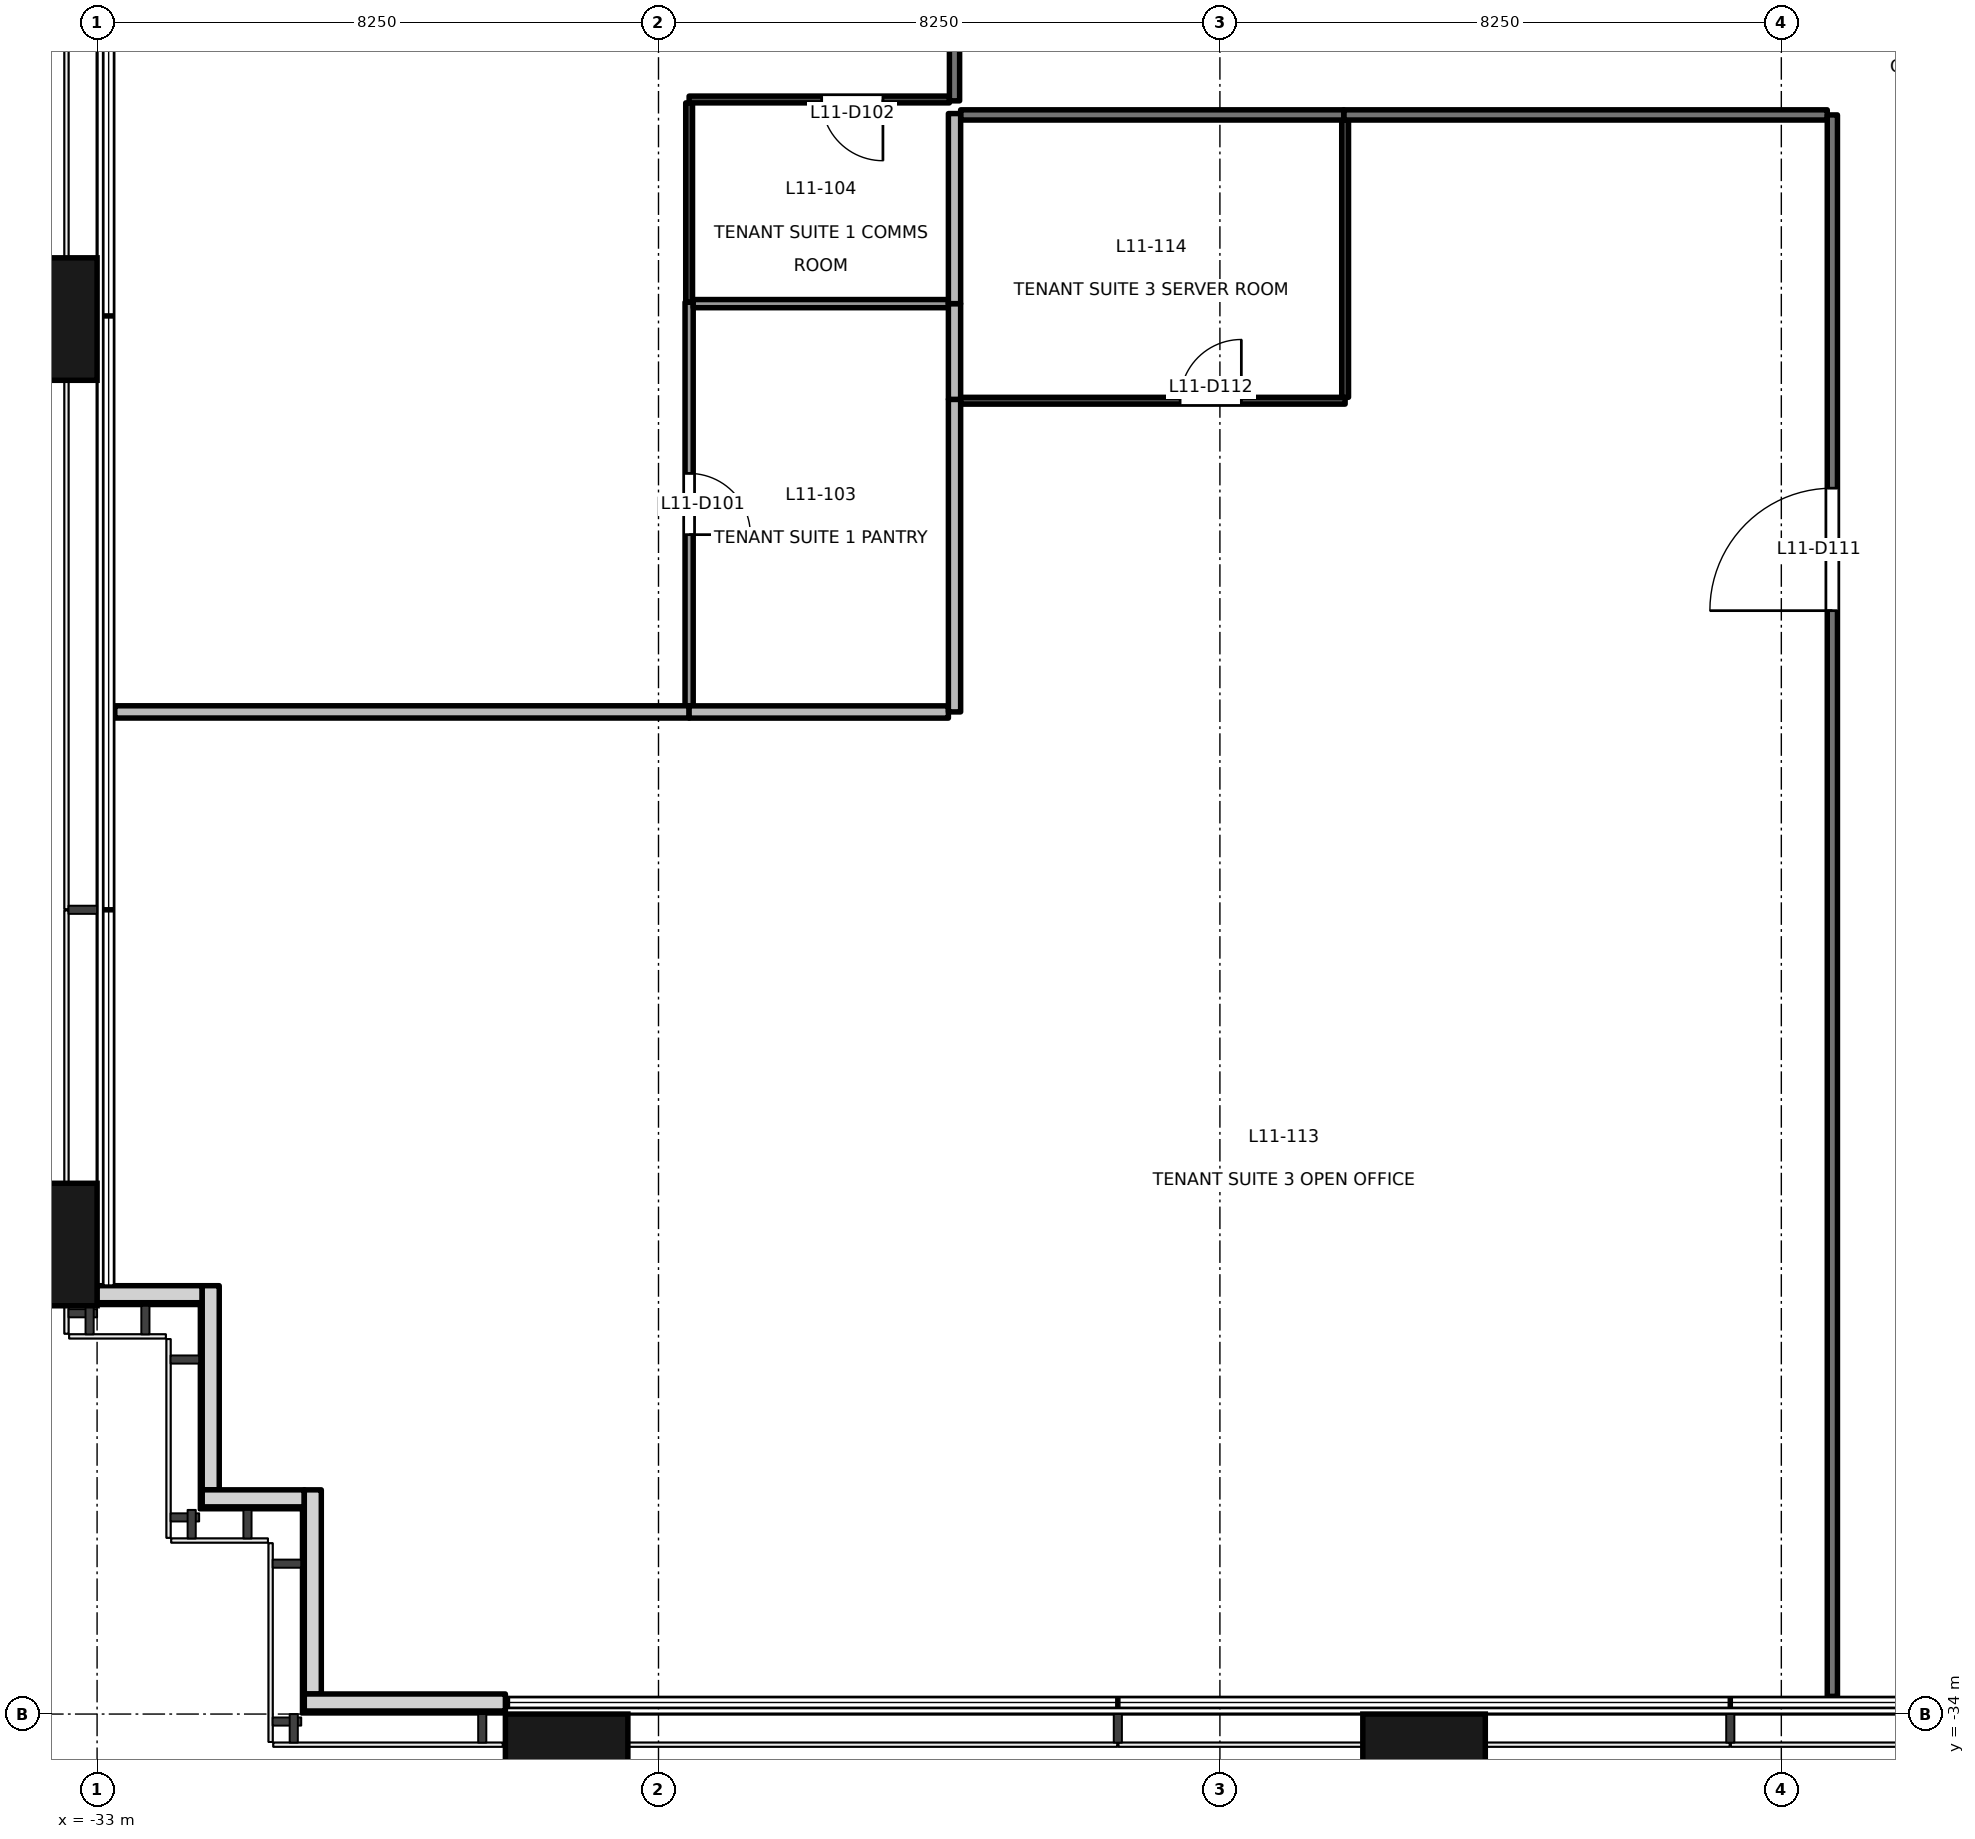
"""IFC4 building model, lengths in metres.
Left out: names, types, materials, properties, quantities, classifications, styles, units other than length and angle.
Written with IfcOpenShell. Run it as: python <this file> out.ifc"""

import sys

from ifc_helpers import new_model, si_unit, direction, frame, frame_2d, origin, origin_2d, place, context, subcontext, project, spatial, rectangle, extrude, element, fill, save


model = new_model("IFC4")
c1 = context("Model", 3, precision=1e-05, world=origin(), true_north=direction((0.0, 1.0)))
c2 = subcontext(c1, "Body", "Model", "MODEL_VIEW")
j1 = project(units=[si_unit("LENGTHUNIT", "METRE"), si_unit("PLANEANGLEUNIT", "RADIAN")], contexts=[c1])
p1 = place(None, origin())
s1 = spatial("IfcSite", under=j1, at=p1, CompositionType="ELEMENT")
p2 = place(p1, origin())
s2 = spatial("IfcBuilding", under=s1, at=p2, CompositionType="ELEMENT")
p3 = place(p2, frame((0.0, 0.0, 52.9)))
s3 = spatial("IfcBuildingStorey", under=s2, at=p3, CompositionType="ELEMENT", Elevation=52.9)
for number, where, z_axis, x_axis in (
    (1, (-26.1, -34.9, -0.2), (0.0, 0.0, 1.0), (1.0, 0.0, 0.0)),
    (2, (-13.5, -34.9, -0.2), (0.0, 0.0, 1.0), (1.0, 0.0, 0.0)),
    (3, (-33.9, -27.1, -0.2), (0.0, 0.0, 1.0), (0.0, 1.0, 0.0)),
    (4, (-33.9, -13.5, -0.2), (0.0, 0.0, 1.0), (0.0, 1.0, 0.0)),
):
    element("IfcColumn", number, at=place(p3, frame(where, z_axis=z_axis, x_axis=x_axis)), inside=s3, PredefinedType="COLUMN", context=c2, shape_type="SweptSolid", body=[
        extrude(rectangle(XDim=1.8, YDim=1.8, at=origin_2d()), origin(), (0.0, 0.0, 1.0), 4.1),
    ])
p4 = place(p3, frame((-33.005, -27.83, 0.0), z_axis=(0.0, 0.0, 1.0), x_axis=(1.0, 0.0, 0.0)))
e5 = element("IfcWall", 5, at=p4, inside=s3, PredefinedType="SOLIDWALL", context=c2, shape_type="SweptSolid", body=[
    extrude(rectangle(XDim=1.55, YDim=0.25, at=frame_2d((0.775, 0.0))), origin(), (0.0, 0.0, 1.0), 3.9),
])
p5 = place(p3, frame((-31.33, -27.705, 0.0), z_axis=(0.0, 0.0, 1.0), x_axis=(0.0, -1.0, 0.0)))
e6 = element("IfcWall", 6, at=p5, inside=s3, PredefinedType="SOLIDWALL", context=c2, shape_type="SweptSolid", body=[
    extrude(rectangle(XDim=3.0, YDim=0.25, at=frame_2d((1.5, 0.0))), origin(), (0.0, 0.0, 1.0), 3.9),
])
p6 = place(p3, frame((-31.455, -30.83, 0.0), z_axis=(0.0, 0.0, 1.0), x_axis=(1.0, 0.0, 0.0)))
e7 = element("IfcWall", 7, at=p6, inside=s3, PredefinedType="SOLIDWALL", context=c2, shape_type="SweptSolid", body=[
    extrude(rectangle(XDim=1.5, YDim=0.25, at=frame_2d((0.75, 0.0))), origin(), (0.0, 0.0, 1.0), 3.9),
])
p7 = place(p3, frame((-29.83, -30.705, 0.0), z_axis=(0.0, 0.0, 1.0), x_axis=(0.0, -1.0, 0.0)))
e8 = element("IfcWall", 8, at=p7, inside=s3, PredefinedType="SOLIDWALL", context=c2, shape_type="SweptSolid", body=[
    extrude(rectangle(XDim=3.0, YDim=0.25, at=frame_2d((1.5, 0.0))), origin(), (0.0, 0.0, 1.0), 3.9),
])
p8 = place(p3, frame((-29.955, -33.83, 0.0), z_axis=(0.0, 0.0, 1.0), x_axis=(1.0, 0.0, 0.0)))
e9 = element("IfcWall", 9, at=p8, inside=s3, PredefinedType="SOLIDWALL", context=c2, shape_type="SweptSolid", body=[
    extrude(rectangle(XDim=2.955, YDim=0.25, at=frame_2d((1.478, 0.0))), origin(), (0.0, 0.0, 1.0), 3.9),
])
p9 = place(p3, frame((-20.4, -10.293, 0.0), z_axis=(0.0, 0.0, 1.0), x_axis=(0.0, 1.0, 0.0)))
e10 = element("IfcWall", 10, at=p9, inside=s3, PredefinedType="PARTITIONING", context=c2, shape_type="SweptSolid", body=[
    extrude(rectangle(XDim=6.04, YDim=0.15, at=frame_2d((3.02, 0.0))), origin(), (0.0, 0.0, 1.0), 3.3),
])
p10 = place(p9, frame((2.12, 0.0, 0.0)))
e11 = element("IfcOpeningElement", 11, at=p10, cuts=e10, PredefinedType="OPENING", context=c2, shape_type="SweptSolid", body=[
    extrude(rectangle(XDim=1.8, YDim=2.1, at=frame_2d((0.9, 1.05))), frame((0.0, 0.085, 0.0), z_axis=(0.0, -1.0, 0.0), x_axis=(1.0, 0.0, 0.0)), (0.0, 0.0, 1.0), 0.171),
])
p11 = place(p3, frame((-7.575, -10.5, 0.0), z_axis=(0.0, 0.0, 1.0), x_axis=(-1.0, 0.0, 0.0)))
e12 = element("IfcWall", 12, at=p11, inside=s3, PredefinedType="PARTITIONING", context=c2, shape_type="SweptSolid", body=[
    extrude(rectangle(XDim=7.105, YDim=0.15, at=frame_2d((3.552, 0.0))), origin(), (0.0, 0.0, 1.0), 2.9),
])
p12 = place(p3, frame((-7.5, -33.74, 0.0), z_axis=(0.0, 0.0, 1.0), x_axis=(0.0, 1.0, 0.0)))
e13 = element("IfcWall", 13, at=p12, inside=s3, PredefinedType="PARTITIONING", context=c2, shape_type="SweptSolid", body=[
    extrude(rectangle(XDim=23.24, YDim=0.15, at=frame_2d((11.62, 0.0))), origin(), (0.0, 0.0, 1.0), 3.9),
])
p13 = place(p12, frame((15.955, 0.0, 0.0)))
e14 = element("IfcOpeningElement", 14, at=p13, cuts=e13, PredefinedType="OPENING", context=c2, shape_type="SweptSolid", body=[
    extrude(rectangle(XDim=1.8, YDim=2.1, at=frame_2d((0.9, 1.05))), frame((0.0, 0.085, 0.0), z_axis=(0.0, -1.0, 0.0), x_axis=(1.0, 0.0, 0.0)), (0.0, 0.0, 1.0), 0.171),
])
p14 = place(p3, frame((-14.68, -10.5, 0.0), z_axis=(0.0, 0.0, 1.0), x_axis=(-1.0, 0.0, 0.0)))
e15 = element("IfcWall", 15, at=p14, inside=s3, PredefinedType="PARTITIONING", context=c2, shape_type="SweptSolid", body=[
    extrude(rectangle(XDim=5.63, YDim=0.15, at=frame_2d((2.815, 0.0))), origin(), (0.0, 0.0, 1.0), 2.5),
])
p15 = place(p3, frame((-24.3, -13.253, 0.0), z_axis=(0.0, 0.0, 1.0), x_axis=(0.0, -1.0, 0.0)))
e16 = element("IfcWall", 16, at=p15, inside=s3, PredefinedType="PARTITIONING", context=c2, shape_type="SweptSolid", body=[
    extrude(rectangle(XDim=5.93, YDim=0.12, at=frame_2d((2.965, 0.0))), origin(), (0.0, 0.0, 1.0), 3.3),
])
p16 = place(p15, frame((2.515, 0.0, 0.0)))
e17 = element("IfcOpeningElement", 17, at=p16, cuts=e16, PredefinedType="OPENING", context=c2, shape_type="SweptSolid", body=[
    extrude(rectangle(XDim=0.9, YDim=2.1, at=frame_2d((0.45, 1.05))), frame((0.0, 0.071, 0.0), z_axis=(0.0, -1.0, 0.0), x_axis=(1.0, 0.0, 0.0)), (0.0, 0.0, 1.0), 0.141),
])
p17 = place(p3, frame((-24.3, -10.323, 0.0), z_axis=(0.0, 0.0, 1.0), x_axis=(0.0, -1.0, 0.0)))
e18 = element("IfcWall", 18, at=p17, inside=s3, PredefinedType="PARTITIONING", context=c2, shape_type="SweptSolid", body=[
    extrude(rectangle(XDim=2.93, YDim=0.1, at=frame_2d((1.465, 0.0))), origin(), (0.0, 0.0, 1.0), 3.9),
])
p18 = place(p3, frame((-20.475, -10.273, 0.0), z_axis=(0.0, 0.0, 1.0), x_axis=(-1.0, 0.0, 0.0)))
e19 = element("IfcWall", 19, at=p18, inside=s3, PredefinedType="PARTITIONING", context=c2, shape_type="SweptSolid", body=[
    extrude(rectangle(XDim=3.825, YDim=0.1, at=frame_2d((1.913, 0.0))), origin(), (0.0, 0.0, 1.0), 3.9),
])
p19 = place(p18, frame((0.977, 0.0, 0.0)))
e20 = element("IfcOpeningElement", 20, at=p19, cuts=e19, PredefinedType="OPENING", context=c2, shape_type="SweptSolid", body=[
    extrude(rectangle(XDim=0.9, YDim=2.1, at=frame_2d((0.45, 1.05))), frame((0.0, 0.061, 0.0), z_axis=(0.0, -1.0, 0.0), x_axis=(1.0, 0.0, 0.0)), (0.0, 0.0, 1.0), 0.121),
])
p20 = place(p3, frame((-24.3, -19.273, 0.0), z_axis=(0.0, 0.0, 1.0), x_axis=(-1.0, 0.0, 0.0)))
e21 = element("IfcWall", 21, at=p20, inside=s3, PredefinedType="PARTITIONING", context=c2, shape_type="SweptSolid", body=[
    extrude(rectangle(XDim=8.44, YDim=0.18, at=frame_2d((4.22, 0.0))), origin(), (0.0, 0.0, 1.0), 3.9),
])
p21 = place(p3, frame((-24.24, -13.273, 0.0), z_axis=(0.0, 0.0, 1.0), x_axis=(1.0, 0.0, 0.0)))
e22 = element("IfcWall", 22, at=p21, inside=s3, PredefinedType="PARTITIONING", context=c2, shape_type="SweptSolid", body=[
    extrude(rectangle(XDim=3.75, YDim=0.12, at=frame_2d((1.875, 0.0))), origin(), (0.0, 0.0, 1.0), 3.9),
])
p22 = place(p3, frame((-20.49, -19.274, 0.0), z_axis=(0.0, 0.0, 1.0), x_axis=(-1.0, 0.0, 0.0)))
e23 = element("IfcWall", 23, at=p22, inside=s3, PredefinedType="PARTITIONING", context=c2, shape_type="SweptSolid", body=[
    extrude(rectangle(XDim=3.81, YDim=0.18, at=frame_2d((1.905, 0.0))), origin(), (0.0, 0.0, 1.0), 3.9),
])
p23 = place(p3, frame((-20.4, -14.68, 0.0), z_axis=(0.0, 0.0, 1.0), x_axis=(0.0, -1.0, 0.0)))
e24 = element("IfcWall", 24, at=p23, inside=s3, PredefinedType="PARTITIONING", context=c2, shape_type="SweptSolid", body=[
    extrude(rectangle(XDim=4.593, YDim=0.18, at=frame_2d((2.296, 0.0))), origin(), (0.0, 0.0, 1.0), 3.3),
])
p24 = place(p3, frame((-20.4, -13.273, 0.0), z_axis=(0.0, 0.0, 1.0), x_axis=(0.0, -1.0, 0.0)))
e25 = element("IfcWall", 25, at=p24, inside=s3, PredefinedType="PARTITIONING", context=c2, shape_type="SweptSolid", body=[
    extrude(rectangle(XDim=1.407, YDim=0.18, at=frame_2d((0.704, 0.0))), origin(), (0.0, 0.0, 1.0), 3.3),
])
p25 = place(p3, frame((-20.4, -10.48, 0.0), z_axis=(0.0, 0.0, 1.0), x_axis=(0.0, -1.0, 0.0)))
e26 = element("IfcWall", 26, at=p25, inside=s3, PredefinedType="PARTITIONING", context=c2, shape_type="SweptSolid", body=[
    extrude(rectangle(XDim=2.793, YDim=0.18, at=frame_2d((1.396, 0.0))), origin(), (0.0, 0.0, 1.0), 3.9),
])
p26 = place(p3, frame((-20.31, -14.7, 0.0), z_axis=(0.0, 0.0, 1.0), x_axis=(1.0, 0.0, 0.0)))
e27 = element("IfcWall", 27, at=p26, inside=s3, PredefinedType="PARTITIONING", context=c2, shape_type="SweptSolid", body=[
    extrude(rectangle(XDim=5.65, YDim=0.1, at=frame_2d((2.825, 0.0))), origin(), (0.0, 0.0, 1.0), 2.5),
])
p27 = place(p26, frame((3.225, 0.0, 0.0)))
e28 = element("IfcOpeningElement", 28, at=p27, cuts=e27, PredefinedType="OPENING", context=c2, shape_type="SweptSolid", body=[
    extrude(rectangle(XDim=0.9, YDim=2.1, at=frame_2d((0.45, 1.05))), frame((0.0, 0.061, 0.0), z_axis=(0.0, -1.0, 0.0), x_axis=(1.0, 0.0, 0.0)), (0.0, 0.0, 1.0), 0.121),
])
p28 = place(p3, frame((-14.66, -14.65, 0.0), z_axis=(0.0, 0.0, 1.0), x_axis=(0.0, 1.0, 0.0)))
e29 = element("IfcWall", 29, at=p28, inside=s3, PredefinedType="PARTITIONING", context=c2, shape_type="SweptSolid", body=[
    extrude(rectangle(XDim=4.075, YDim=0.1, at=frame_2d((2.038, 0.0))), origin(), (0.0, 0.0, 1.0), 3.9),
])
p29 = place(p16, origin())
e30 = element("IfcDoor", 30, at=p29, inside=s3, OperationType="SINGLE_SWING_RIGHT", PredefinedType="DOOR", context=c2, shape_type="SweptSolid", body=[
    extrude(rectangle(XDim=0.9, YDim=2.1, at=frame_2d((0.45, 1.05))), frame((0.0, 0.025, 0.0), z_axis=(0.0, -1.0, 0.0), x_axis=(1.0, 0.0, 0.0)), (0.0, 0.0, 1.0), 0.05),
])
fill(e17, e30)
p30 = place(p19, origin())
e31 = element("IfcDoor", 31, at=p30, inside=s3, OperationType="SINGLE_SWING_LEFT", PredefinedType="DOOR", context=c2, shape_type="SweptSolid", body=[
    extrude(rectangle(XDim=0.9, YDim=2.1, at=frame_2d((0.45, 1.05))), frame((0.0, 0.025, 0.0), z_axis=(0.0, -1.0, 0.0), x_axis=(1.0, 0.0, 0.0)), (0.0, 0.0, 1.0), 0.05),
])
fill(e20, e31)
p31 = place(p13, origin())
e32 = element("IfcDoor", 32, at=p31, inside=s3, OperationType="DOUBLE_DOOR_SINGLE_SWING", PredefinedType="DOOR", context=c2, shape_type="SweptSolid", body=[
    extrude(rectangle(XDim=1.8, YDim=2.1, at=frame_2d((0.9, 1.05))), frame((0.0, 0.025, 0.0), z_axis=(0.0, -1.0, 0.0), x_axis=(1.0, 0.0, 0.0)), (0.0, 0.0, 1.0), 0.05),
])
fill(e14, e32)
p32 = place(p27, origin())
e33 = element("IfcDoor", 33, at=p32, inside=s3, OperationType="SINGLE_SWING_RIGHT", PredefinedType="DOOR", context=c2, shape_type="SweptSolid", body=[
    extrude(rectangle(XDim=0.9, YDim=2.1, at=frame_2d((0.45, 1.05))), frame((0.0, 0.025, 0.0), z_axis=(0.0, -1.0, 0.0), x_axis=(1.0, 0.0, 0.0)), (0.0, 0.0, 1.0), 0.05),
])
fill(e28, e33)
save(model, sys.argv[1])
